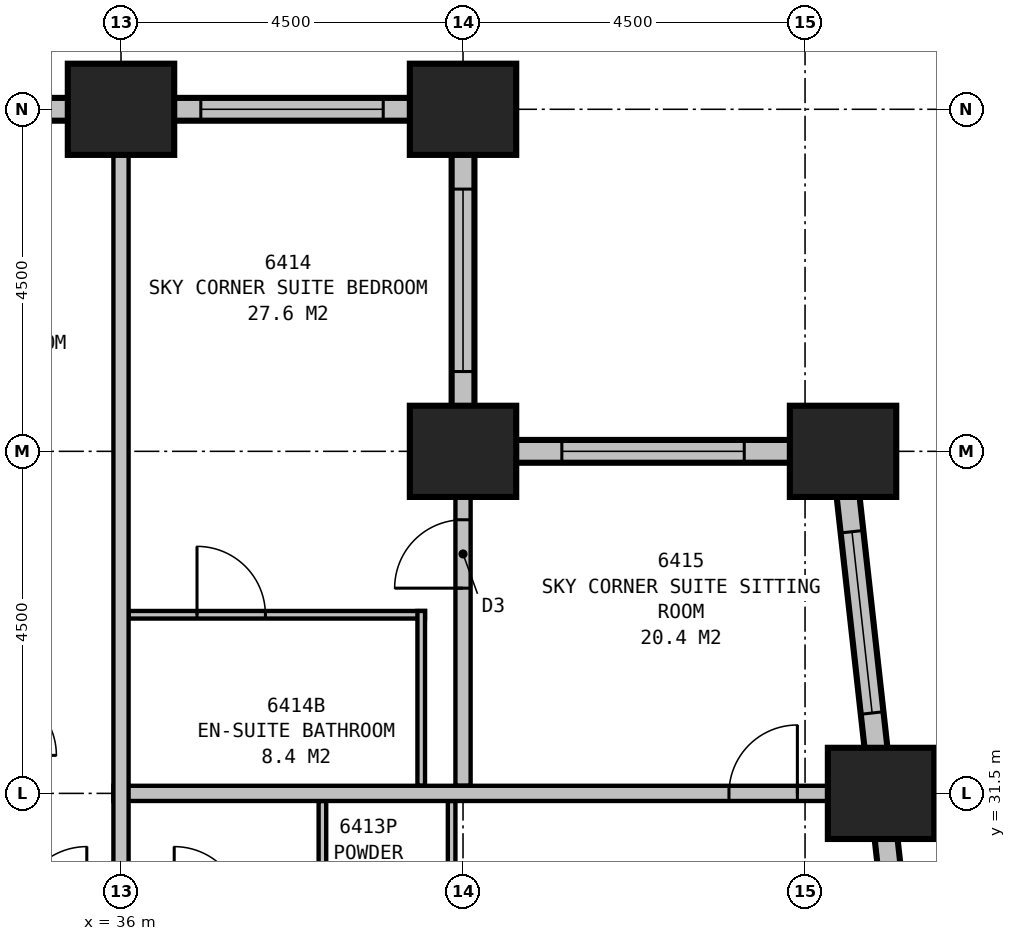
"""IFC4 building model, lengths in metres.
Left out: names, types, materials, properties, quantities, classifications, styles, units other than length and angle.
Written with IfcOpenShell. Run it as: python <this file> out.ifc"""

import sys

from ifc_helpers import new_model, si_unit, direction, frame, frame_2d, origin, origin_2d, place, context, subcontext, project, spatial, rectangle, extrude, element, fill, save


model = new_model("IFC4")
c1 = context("Model", 3, precision=1e-05, world=origin(), true_north=direction((0.0, 1.0)))
c2 = subcontext(c1, "Body", "Model", "MODEL_VIEW")
j1 = project(units=[si_unit("LENGTHUNIT", "METRE"), si_unit("PLANEANGLEUNIT", "RADIAN")], contexts=[c1])
p1 = place(None, origin())
s1 = spatial("IfcSite", under=j1, at=p1, CompositionType="ELEMENT")
p2 = place(p1, origin())
s2 = spatial("IfcBuilding", under=s1, at=p2, CompositionType="ELEMENT")
p3 = place(p2, frame((0.0, 0.0, 250.7)))
s3 = spatial("IfcBuildingStorey", under=s2, at=p3, CompositionType="ELEMENT", Elevation=250.7)
for number, where, z_axis, x_axis in (
    (1, (46.0, 31.5, 0.0), (0.0, 0.0, 1.0), (1.0, 0.0, 0.0)),
    (2, (45.5, 36.0, 0.0), (0.0, 0.0, 1.0), (1.0, 0.0, 0.0)),
    (3, (40.5, 36.0, 0.0), (0.0, 0.0, 1.0), (1.0, 0.0, 0.0)),
    (4, (40.5, 40.5, 0.0), (0.0, 0.0, 1.0), (1.0, 0.0, 0.0)),
    (5, (36.0, 40.5, 0.0), (0.0, 0.0, 1.0), (1.0, 0.0, 0.0)),
):
    element("IfcColumn", number, at=place(p3, frame(where, z_axis=z_axis, x_axis=x_axis)), inside=s3, PredefinedType="COLUMN", context=c2, shape_type="SweptSolid", body=[
        extrude(rectangle(XDim=1.4, YDim=1.2, at=origin_2d()), origin(), (0.0, 0.0, 1.0), 3.9),
    ])
p4 = place(p3, frame((49.017, 4.351, 0.0), z_axis=(0.0, 0.0, 1.0), x_axis=(-0.110433201132, 0.993883548555, 0.0)))
e6 = element("IfcWall", 6, at=p4, inside=s3, PredefinedType="STANDARD", context=c2, shape_type="SweptSolid", body=[
    extrude(rectangle(XDim=31.994, YDim=0.3, at=frame_2d((15.997, 0.0))), origin(), (0.0, 0.0, 1.0), 2.65),
])
p5 = place(p4, frame((1.214, 0.0, 0.5)))
e7 = element("IfcOpeningElement", 7, at=p5, cuts=e6, PredefinedType="OPENING", context=c2, shape_type="SweptSolid", body=[
    extrude(rectangle(XDim=2.4, YDim=2.0, at=frame_2d((1.2, 1.0))), frame((0.0, 0.16, 0.0), z_axis=(0.0, -1.0, 0.0), x_axis=(1.0, 0.0, 0.0)), (0.0, 0.0, 1.0), 0.32),
])
p6 = place(p4, frame((5.742, 0.0, 0.5)))
e8 = element("IfcOpeningElement", 8, at=p6, cuts=e6, PredefinedType="OPENING", context=c2, shape_type="SweptSolid", body=[
    extrude(rectangle(XDim=2.4, YDim=2.0, at=frame_2d((1.2, 1.0))), frame((0.0, 0.16, 0.0), z_axis=(0.0, -1.0, 0.0), x_axis=(1.0, 0.0, 0.0)), (0.0, 0.0, 1.0), 0.32),
])
p7 = place(p4, frame((10.269, 0.0, 0.5)))
e9 = element("IfcOpeningElement", 9, at=p7, cuts=e6, PredefinedType="OPENING", context=c2, shape_type="SweptSolid", body=[
    extrude(rectangle(XDim=2.4, YDim=2.0, at=frame_2d((1.2, 1.0))), frame((0.0, 0.16, 0.0), z_axis=(0.0, -1.0, 0.0), x_axis=(1.0, 0.0, 0.0)), (0.0, 0.0, 1.0), 0.32),
])
p8 = place(p4, frame((14.797, 0.0, 0.5)))
e10 = element("IfcOpeningElement", 10, at=p8, cuts=e6, PredefinedType="OPENING", context=c2, shape_type="SweptSolid", body=[
    extrude(rectangle(XDim=2.4, YDim=2.0, at=frame_2d((1.2, 1.0))), frame((0.0, 0.16, 0.0), z_axis=(0.0, -1.0, 0.0), x_axis=(1.0, 0.0, 0.0)), (0.0, 0.0, 1.0), 0.32),
])
p9 = place(p4, frame((19.325, 0.0, 0.5)))
e11 = element("IfcOpeningElement", 11, at=p9, cuts=e6, PredefinedType="OPENING", context=c2, shape_type="SweptSolid", body=[
    extrude(rectangle(XDim=2.4, YDim=2.0, at=frame_2d((1.2, 1.0))), frame((0.0, 0.16, 0.0), z_axis=(0.0, -1.0, 0.0), x_axis=(1.0, 0.0, 0.0)), (0.0, 0.0, 1.0), 0.32),
])
p10 = place(p4, frame((23.852, 0.0, 0.5)))
e12 = element("IfcOpeningElement", 12, at=p10, cuts=e6, PredefinedType="OPENING", context=c2, shape_type="SweptSolid", body=[
    extrude(rectangle(XDim=2.4, YDim=2.0, at=frame_2d((1.2, 1.0))), frame((0.0, 0.16, 0.0), z_axis=(0.0, -1.0, 0.0), x_axis=(1.0, 0.0, 0.0)), (0.0, 0.0, 1.0), 0.32),
])
p11 = place(p4, frame((28.38, 0.0, 0.5)))
e13 = element("IfcOpeningElement", 13, at=p11, cuts=e6, PredefinedType="OPENING", context=c2, shape_type="SweptSolid", body=[
    extrude(rectangle(XDim=2.4, YDim=2.0, at=frame_2d((1.2, 1.0))), frame((0.0, 0.16, 0.0), z_axis=(0.0, -1.0, 0.0), x_axis=(1.0, 0.0, 0.0)), (0.0, 0.0, 1.0), 0.32),
])
p12 = place(p3, frame((45.65, 36.0, 0.0), z_axis=(0.0, 0.0, 1.0), x_axis=(-1.0, 0.0, 0.0)))
e14 = element("IfcWall", 14, at=p12, inside=s3, PredefinedType="STANDARD", context=c2, shape_type="SweptSolid", body=[
    extrude(rectangle(XDim=5.3, YDim=0.3, at=frame_2d((2.65, 0.0))), origin(), (0.0, 0.0, 1.0), 2.65),
])
p13 = place(p12, frame((1.45, 0.0, 0.5)))
e15 = element("IfcOpeningElement", 15, at=p13, cuts=e14, PredefinedType="OPENING", context=c2, shape_type="SweptSolid", body=[
    extrude(rectangle(XDim=2.4, YDim=2.0, at=frame_2d((1.2, 1.0))), frame((0.0, 0.16, 0.0), z_axis=(0.0, -1.0, 0.0), x_axis=(1.0, 0.0, 0.0)), (0.0, 0.0, 1.0), 0.32),
])
p14 = place(p3, frame((40.5, 35.85, 0.0), z_axis=(0.0, 0.0, 1.0), x_axis=(0.0, 1.0, 0.0)))
e16 = element("IfcWall", 16, at=p14, inside=s3, PredefinedType="STANDARD", context=c2, shape_type="SweptSolid", body=[
    extrude(rectangle(XDim=4.8, YDim=0.3, at=frame_2d((2.4, 0.0))), origin(), (0.0, 0.0, 1.0), 2.65),
])
p15 = place(p14, frame((1.2, 0.0, 0.5)))
e17 = element("IfcOpeningElement", 17, at=p15, cuts=e16, PredefinedType="OPENING", context=c2, shape_type="SweptSolid", body=[
    extrude(rectangle(XDim=2.4, YDim=2.0, at=frame_2d((1.2, 1.0))), frame((0.0, 0.16, 0.0), z_axis=(0.0, -1.0, 0.0), x_axis=(1.0, 0.0, 0.0)), (0.0, 0.0, 1.0), 0.32),
])
p16 = place(p3, frame((40.65, 40.5, 0.0), z_axis=(0.0, 0.0, 1.0), x_axis=(-1.0, 0.0, 0.0)))
e18 = element("IfcWall", 18, at=p16, inside=s3, PredefinedType="STANDARD", context=c2, shape_type="SweptSolid", body=[
    extrude(rectangle(XDim=27.3, YDim=0.3, at=frame_2d((13.65, 0.0))), origin(), (0.0, 0.0, 1.0), 2.65),
])
p17 = place(p16, frame((1.2, 0.0, 0.5)))
e19 = element("IfcOpeningElement", 19, at=p17, cuts=e18, PredefinedType="OPENING", context=c2, shape_type="SweptSolid", body=[
    extrude(rectangle(XDim=2.4, YDim=2.0, at=frame_2d((1.2, 1.0))), frame((0.0, 0.16, 0.0), z_axis=(0.0, -1.0, 0.0), x_axis=(1.0, 0.0, 0.0)), (0.0, 0.0, 1.0), 0.32),
])
p18 = place(p16, frame((5.7, 0.0, 0.5)))
e20 = element("IfcOpeningElement", 20, at=p18, cuts=e18, PredefinedType="OPENING", context=c2, shape_type="SweptSolid", body=[
    extrude(rectangle(XDim=2.4, YDim=2.0, at=frame_2d((1.2, 1.0))), frame((0.0, 0.16, 0.0), z_axis=(0.0, -1.0, 0.0), x_axis=(1.0, 0.0, 0.0)), (0.0, 0.0, 1.0), 0.32),
])
p19 = place(p16, frame((10.2, 0.0, 0.5)))
e21 = element("IfcOpeningElement", 21, at=p19, cuts=e18, PredefinedType="OPENING", context=c2, shape_type="SweptSolid", body=[
    extrude(rectangle(XDim=2.4, YDim=2.0, at=frame_2d((1.2, 1.0))), frame((0.0, 0.16, 0.0), z_axis=(0.0, -1.0, 0.0), x_axis=(1.0, 0.0, 0.0)), (0.0, 0.0, 1.0), 0.32),
])
p20 = place(p16, frame((14.7, 0.0, 0.5)))
e22 = element("IfcOpeningElement", 22, at=p20, cuts=e18, PredefinedType="OPENING", context=c2, shape_type="SweptSolid", body=[
    extrude(rectangle(XDim=2.4, YDim=2.0, at=frame_2d((1.2, 1.0))), frame((0.0, 0.16, 0.0), z_axis=(0.0, -1.0, 0.0), x_axis=(1.0, 0.0, 0.0)), (0.0, 0.0, 1.0), 0.32),
])
p21 = place(p16, frame((19.2, 0.0, 0.5)))
e23 = element("IfcOpeningElement", 23, at=p21, cuts=e18, PredefinedType="OPENING", context=c2, shape_type="SweptSolid", body=[
    extrude(rectangle(XDim=2.4, YDim=2.0, at=frame_2d((1.2, 1.0))), frame((0.0, 0.16, 0.0), z_axis=(0.0, -1.0, 0.0), x_axis=(1.0, 0.0, 0.0)), (0.0, 0.0, 1.0), 0.32),
])
p22 = place(p16, frame((23.7, 0.0, 0.5)))
e24 = element("IfcOpeningElement", 24, at=p22, cuts=e18, PredefinedType="OPENING", context=c2, shape_type="SweptSolid", body=[
    extrude(rectangle(XDim=2.4, YDim=2.0, at=frame_2d((1.2, 1.0))), frame((0.0, 0.16, 0.0), z_axis=(0.0, -1.0, 0.0), x_axis=(1.0, 0.0, 0.0)), (0.0, 0.0, 1.0), 0.32),
])
p23 = place(p3, frame((36.0, 29.9, 0.0), z_axis=(0.0, 0.0, 1.0), x_axis=(0.0, 1.0, 0.0)))
e25 = element("IfcWall", 25, at=p23, inside=s3, PredefinedType="PARTITIONING", context=c2, shape_type="SweptSolid", body=[
    extrude(rectangle(XDim=10.6, YDim=0.2, at=frame_2d((5.3, 0.0))), origin(), (0.0, 0.0, 1.0), 2.65),
])
p24 = place(p3, frame((35.9, 31.5, 0.0), z_axis=(0.0, 0.0, 1.0), x_axis=(1.0, 0.0, 0.0)))
e26 = element("IfcWall", 26, at=p24, inside=s3, PredefinedType="PARTITIONING", context=c2, shape_type="SweptSolid", body=[
    extrude(rectangle(XDim=10.099, YDim=0.2, at=frame_2d((5.05, 0.0))), origin(), (0.0, 0.0, 1.0), 3.65),
])
p25 = place(p24, frame((8.099, 0.0, 0.0)))
e27 = element("IfcOpeningElement", 27, at=p25, cuts=e26, PredefinedType="OPENING", context=c2, shape_type="SweptSolid", body=[
    extrude(rectangle(XDim=0.9, YDim=2.1, at=frame_2d((0.45, 1.05))), frame((0.0, 0.11, 0.0), z_axis=(0.0, -1.0, 0.0), x_axis=(1.0, 0.0, 0.0)), (0.0, 0.0, 1.0), 0.22),
])
p26 = place(p3, frame((40.35, 31.4, 0.0), z_axis=(0.0, 0.0, 1.0), x_axis=(0.0, -1.0, 0.0)))
e28 = element("IfcWall", 28, at=p26, inside=s3, PredefinedType="PLUMBINGWALL", context=c2, shape_type="SweptSolid", body=[
    extrude(rectangle(XDim=2.0, YDim=0.1, at=frame_2d((1.0, 0.0))), origin(), (0.0, 0.0, 1.0), 2.75),
])
p27 = place(p3, frame((38.65, 31.4, 0.0), z_axis=(0.0, 0.0, 1.0), x_axis=(0.0, -1.0, 0.0)))
e29 = element("IfcWall", 29, at=p27, inside=s3, PredefinedType="PLUMBINGWALL", context=c2, shape_type="SweptSolid", body=[
    extrude(rectangle(XDim=2.0, YDim=0.1, at=frame_2d((1.0, 0.0))), origin(), (0.0, 0.0, 1.0), 3.65),
])
p28 = place(p3, frame((40.5, 31.6, 0.0), z_axis=(0.0, 0.0, 1.0), x_axis=(0.0, 1.0, 0.0)))
e30 = element("IfcWall", 30, at=p28, inside=s3, PredefinedType="PARTITIONING", context=c2, shape_type="SweptSolid", body=[
    extrude(rectangle(XDim=4.4, YDim=0.2, at=frame_2d((2.2, 0.0))), origin(), (0.0, 0.0, 1.0), 2.75),
])
p29 = place(p28, frame((2.6, 0.0, 0.0)))
e31 = element("IfcOpeningElement", 31, at=p29, cuts=e30, PredefinedType="OPENING", context=c2, shape_type="SweptSolid", body=[
    extrude(rectangle(XDim=0.9, YDim=2.1, at=frame_2d((0.45, 1.05))), frame((0.0, 0.11, 0.0), z_axis=(0.0, -1.0, 0.0), x_axis=(1.0, 0.0, 0.0)), (0.0, 0.0, 1.0), 0.22),
])
p30 = place(p3, frame((39.95, 31.6, 0.0), z_axis=(0.0, 0.0, 1.0), x_axis=(0.0, 1.0, 0.0)))
e32 = element("IfcWall", 32, at=p30, inside=s3, PredefinedType="PLUMBINGWALL", context=c2, shape_type="SweptSolid", body=[
    extrude(rectangle(XDim=2.3, YDim=0.1, at=frame_2d((1.15, 0.0))), origin(), (0.0, 0.0, 1.0), 3.65),
])
p31 = place(p3, frame((36.1, 33.85, 0.0), z_axis=(0.0, 0.0, 1.0), x_axis=(1.0, 0.0, 0.0)))
e33 = element("IfcWall", 33, at=p31, inside=s3, PredefinedType="PLUMBINGWALL", context=c2, shape_type="SweptSolid", body=[
    extrude(rectangle(XDim=3.9, YDim=0.1, at=frame_2d((1.95, 0.0))), origin(), (0.0, 0.0, 1.0), 3.65),
])
p32 = place(p31, frame((0.9, 0.0, 0.0)))
e34 = element("IfcOpeningElement", 34, at=p32, cuts=e33, PredefinedType="OPENING", context=c2, shape_type="SweptSolid", body=[
    extrude(rectangle(XDim=0.9, YDim=2.1, at=frame_2d((0.45, 1.05))), frame((0.0, 0.06, 0.0), z_axis=(0.0, -1.0, 0.0), x_axis=(1.0, 0.0, 0.0)), (0.0, 0.0, 1.0), 0.12),
])
p33 = place(p11, origin())
e35 = element("IfcWindow", 35, at=p33, inside=s3, PartitioningType="SINGLE_PANEL", PredefinedType="WINDOW", context=c2, shape_type="SweptSolid", body=[
    extrude(rectangle(XDim=2.4, YDim=2.0, at=frame_2d((1.2, 1.0))), frame((0.0, 0.03, 0.0), z_axis=(0.0, -1.0, 0.0), x_axis=(1.0, 0.0, 0.0)), (0.0, 0.0, 1.0), 0.06),
])
fill(e13, e35)
p34 = place(p13, origin())
e36 = element("IfcWindow", 36, at=p34, inside=s3, PartitioningType="SINGLE_PANEL", PredefinedType="WINDOW", context=c2, shape_type="SweptSolid", body=[
    extrude(rectangle(XDim=2.4, YDim=2.0, at=frame_2d((1.2, 1.0))), frame((0.0, 0.03, 0.0), z_axis=(0.0, -1.0, 0.0), x_axis=(1.0, 0.0, 0.0)), (0.0, 0.0, 1.0), 0.06),
])
fill(e15, e36)
p35 = place(p15, origin())
e37 = element("IfcWindow", 37, at=p35, inside=s3, PartitioningType="SINGLE_PANEL", PredefinedType="WINDOW", context=c2, shape_type="SweptSolid", body=[
    extrude(rectangle(XDim=2.4, YDim=2.0, at=frame_2d((1.2, 1.0))), frame((0.0, 0.03, 0.0), z_axis=(0.0, -1.0, 0.0), x_axis=(1.0, 0.0, 0.0)), (0.0, 0.0, 1.0), 0.06),
])
fill(e17, e37)
p36 = place(p17, origin())
e38 = element("IfcWindow", 38, at=p36, inside=s3, PartitioningType="SINGLE_PANEL", PredefinedType="WINDOW", context=c2, shape_type="SweptSolid", body=[
    extrude(rectangle(XDim=2.4, YDim=2.0, at=frame_2d((1.2, 1.0))), frame((0.0, 0.03, 0.0), z_axis=(0.0, -1.0, 0.0), x_axis=(1.0, 0.0, 0.0)), (0.0, 0.0, 1.0), 0.06),
])
fill(e19, e38)
p37 = place(p25, origin())
e39 = element("IfcDoor", 39, at=p37, inside=s3, OperationType="SINGLE_SWING_RIGHT", PredefinedType="DOOR", context=c2, shape_type="SweptSolid", body=[
    extrude(rectangle(XDim=0.9, YDim=2.1, at=frame_2d((0.45, 1.05))), frame((0.0, 0.025, 0.0), z_axis=(0.0, -1.0, 0.0), x_axis=(1.0, 0.0, 0.0)), (0.0, 0.0, 1.0), 0.05),
])
fill(e27, e39)
p38 = place(p29, origin())
e40 = element("IfcDoor", 40, at=p38, inside=s3, OperationType="SINGLE_SWING_LEFT", PredefinedType="DOOR", context=c2, shape_type="SweptSolid", body=[
    extrude(rectangle(XDim=0.9, YDim=2.1, at=frame_2d((0.45, 1.05))), frame((0.0, 0.025, 0.0), z_axis=(0.0, -1.0, 0.0), x_axis=(1.0, 0.0, 0.0)), (0.0, 0.0, 1.0), 0.05),
])
fill(e31, e40)
p39 = place(p32, origin())
e41 = element("IfcDoor", 41, at=p39, inside=s3, OperationType="SINGLE_SWING_LEFT", PredefinedType="DOOR", context=c2, shape_type="SweptSolid", body=[
    extrude(rectangle(XDim=0.9, YDim=2.1, at=frame_2d((0.45, 1.05))), frame((0.0, 0.025, 0.0), z_axis=(0.0, -1.0, 0.0), x_axis=(1.0, 0.0, 0.0)), (0.0, 0.0, 1.0), 0.05),
])
fill(e34, e41)
save(model, sys.argv[1])
